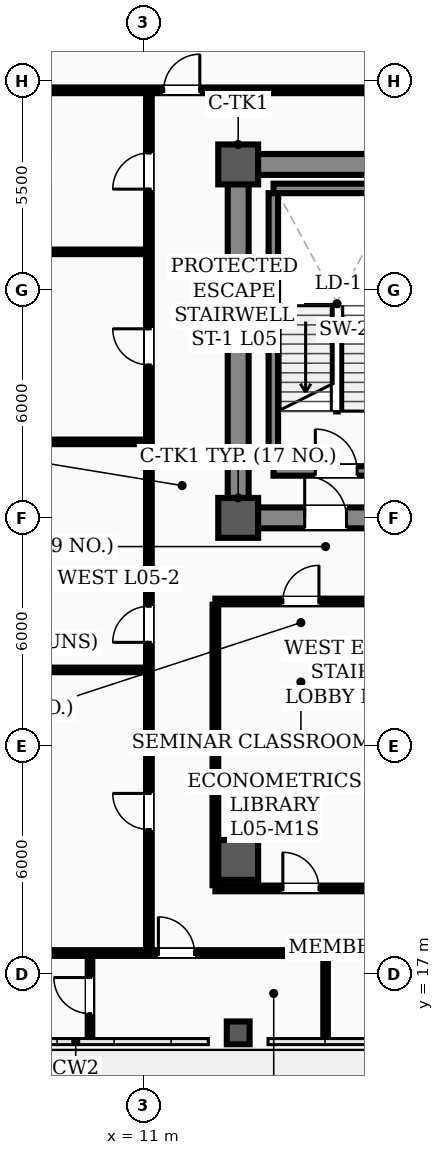
"""IFC4 building model, lengths in metres.
Left out: names, types, materials, properties, quantities, classifications, styles, units other than length and angle.
Written with IfcOpenShell. Run it as: python <this file> out.ifc"""

import sys

from ifc_helpers import new_model, si_unit, direction, frame, frame_2d, origin, origin_2d, place, context, subcontext, project, spatial, rectangle, hollow_rectangle, extrude, element, fill, save


model = new_model("IFC4")
c1 = context("Model", 3, precision=1e-05, world=origin(), true_north=direction((0.0, 1.0)))
c2 = subcontext(c1, "Body", "Model", "MODEL_VIEW")
j1 = project(units=[si_unit("LENGTHUNIT", "METRE"), si_unit("PLANEANGLEUNIT", "RADIAN")], contexts=[c1])
p1 = place(None, origin())
s1 = spatial("IfcSite", under=j1, at=p1, CompositionType="ELEMENT")
p2 = place(p1, origin())
s2 = spatial("IfcBuilding", under=s1, at=p2, CompositionType="ELEMENT")
p3 = place(p2, frame((0.0, 0.0, 22.0)))
s3 = spatial("IfcBuildingStorey", under=s2, at=p3, CompositionType="ELEMENT", Elevation=22.0)
for number, where, z_axis, x_axis in (
    (1, (13.5, 29.0, 0.0), (0.0, 0.0, 1.0), (1.0, 0.0, 0.0)),
    (2, (13.5, 38.3, 0.0), (0.0, 0.0, 1.0), (1.0, 0.0, 0.0)),
    (3, (13.5, 20.0, 0.0), (0.0, 0.0, 1.0), (1.0, 0.0, 0.0)),
):
    element("IfcColumn", number, at=place(p3, frame(where, z_axis=z_axis, x_axis=x_axis)), inside=s3, PredefinedType="COLUMN", context=c2, shape_type="SweptSolid", body=[
        extrude(hollow_rectangle(XDim=1.05, YDim=1.05, WallThickness=0.038, InnerFilletRadius=0.019, OuterFilletRadius=0.057, at=origin_2d()), origin(), (0.0, 0.0, 1.0), 4.5),
    ])
p4 = place(p3, frame((13.5, 15.45, 0.0), z_axis=(0.0, 0.0, 1.0), x_axis=(1.0, 0.0, 0.0)))
e4 = element("IfcColumn", 4, at=p4, inside=s3, PredefinedType="COLUMN", context=c2, shape_type="SweptSolid", body=[
    extrude(hollow_rectangle(XDim=0.6, YDim=0.6, WallThickness=0.026, InnerFilletRadius=0.013, OuterFilletRadius=0.039, at=origin_2d()), origin(), (0.0, 0.0, 1.0), 4.5),
])
p5 = place(p3, frame((13.5, 29.0, 0.0), z_axis=(0.0, 0.0, 1.0), x_axis=(1.0, 0.0, 0.0)))
e5 = element("IfcWall", 5, at=p5, inside=s3, PredefinedType="SHEAR", context=c2, shape_type="SweptSolid", body=[
    extrude(rectangle(XDim=30.5, YDim=0.55, at=frame_2d((15.25, 0.0))), origin(), (0.0, 0.0, 1.0), 4.32),
])
p6 = place(p5, frame((1.75, 0.0, 0.0)))
e6 = element("IfcOpeningElement", 6, at=p6, cuts=e5, PredefinedType="OPENING", context=c2, shape_type="SweptSolid", body=[
    extrude(rectangle(XDim=1.1, YDim=2.08, at=frame_2d((0.55, 1.04))), frame((0.0, 0.285, 0.0), z_axis=(0.0, -1.0, 0.0), x_axis=(1.0, 0.0, 0.0)), (0.0, 0.0, 1.0), 0.57),
])
p7 = place(p5, frame((26.7, 0.0, 0.0)))
e7 = element("IfcOpeningElement", 7, at=p7, cuts=e5, PredefinedType="OPENING", context=c2, shape_type="SweptSolid", body=[
    extrude(rectangle(XDim=1.1, YDim=2.08, at=frame_2d((0.55, 1.04))), frame((0.0, 0.285, 0.0), z_axis=(0.0, -1.0, 0.0), x_axis=(1.0, 0.0, 0.0)), (0.0, 0.0, 1.0), 0.57),
])
p8 = place(p5, frame((6.8, 0.0, 0.0)))
e8 = element("IfcOpeningElement", 8, at=p8, cuts=e5, PredefinedType="OPENING", context=c2, shape_type="SweptSolid", body=[
    extrude(rectangle(XDim=1.1, YDim=2.08, at=frame_2d((0.55, 1.04))), frame((0.0, 0.285, 0.0), z_axis=(0.0, -1.0, 0.0), x_axis=(1.0, 0.0, 0.0)), (0.0, 0.0, 1.0), 0.57),
])
p9 = place(p5, frame((13.2, 0.0, 0.0)))
e9 = element("IfcOpeningElement", 9, at=p9, cuts=e5, PredefinedType="OPENING", context=c2, shape_type="SweptSolid", body=[
    extrude(rectangle(XDim=1.6, YDim=2.08, at=frame_2d((0.8, 1.04))), frame((0.0, 0.285, 0.0), z_axis=(0.0, -1.0, 0.0), x_axis=(1.0, 0.0, 0.0)), (0.0, 0.0, 1.0), 0.57),
])
p10 = place(p5, frame((19.5, 0.0, 0.0)))
e10 = element("IfcOpeningElement", 10, at=p10, cuts=e5, PredefinedType="OPENING", context=c2, shape_type="SweptSolid", body=[
    extrude(rectangle(XDim=0.9, YDim=2.08, at=frame_2d((0.45, 1.04))), frame((0.0, 0.285, 0.0), z_axis=(0.0, -1.0, 0.0), x_axis=(1.0, 0.0, 0.0)), (0.0, 0.0, 1.0), 0.57),
])
p11 = place(p5, frame((21.55, 0.0, 0.0)))
e11 = element("IfcOpeningElement", 11, at=p11, cuts=e5, PredefinedType="OPENING", context=c2, shape_type="SweptSolid", body=[
    extrude(rectangle(XDim=0.9, YDim=2.08, at=frame_2d((0.45, 1.04))), frame((0.0, 0.285, 0.0), z_axis=(0.0, -1.0, 0.0), x_axis=(1.0, 0.0, 0.0)), (0.0, 0.0, 1.0), 0.57),
])
p12 = place(p3, frame((13.5, 38.3, 0.0), z_axis=(0.0, 0.0, 1.0), x_axis=(1.0, 0.0, 0.0)))
e12 = element("IfcWall", 12, at=p12, inside=s3, PredefinedType="SHEAR", context=c2, shape_type="SweptSolid", body=[
    extrude(rectangle(XDim=30.5, YDim=0.55, at=frame_2d((15.25, 0.0))), origin(), (0.0, 0.0, 1.0), 4.32),
])
p13 = place(p3, frame((13.5, 29.35, 0.0), z_axis=(0.0, 0.0, 1.0), x_axis=(0.0, 1.0, 0.0)))
e13 = element("IfcWall", 13, at=p13, inside=s3, PredefinedType="SHEAR", context=c2, shape_type="SweptSolid", body=[
    extrude(rectangle(XDim=8.6, YDim=0.55, at=frame_2d((4.3, 0.0))), origin(), (0.0, 0.0, 1.0), 4.32),
])
p14 = place(p3, frame((14.43, 30.235, 0.0), z_axis=(0.0, 0.0, 1.0), x_axis=(1.0, 0.0, 0.0)))
e14 = element("IfcWall", 14, at=p14, inside=s3, PredefinedType="STANDARD", context=c2, shape_type="SweptSolid", body=[
    extrude(rectangle(XDim=3.34, YDim=0.25, at=frame_2d((1.67, 0.0))), origin(), (0.0, 0.0, 1.0), 4.32),
])
p15 = place(p14, frame((1.1, 0.0, 0.0)))
e15 = element("IfcOpeningElement", 15, at=p15, cuts=e14, PredefinedType="OPENING", context=c2, shape_type="SweptSolid", body=[
    extrude(rectangle(XDim=1.1, YDim=2.08, at=frame_2d((0.55, 1.04))), frame((0.0, 0.135, 0.0), z_axis=(0.0, -1.0, 0.0), x_axis=(1.0, 0.0, 0.0)), (0.0, 0.0, 1.0), 0.27),
])
p16 = place(p3, frame((14.43, 37.669, 0.0), z_axis=(0.0, 0.0, 1.0), x_axis=(1.0, 0.0, 0.0)))
e16 = element("IfcWall", 16, at=p16, inside=s3, PredefinedType="STANDARD", context=c2, shape_type="SweptSolid", body=[
    extrude(rectangle(XDim=3.34, YDim=0.25, at=frame_2d((1.67, 0.0))), origin(), (0.0, 0.0, 1.0), 4.32),
])
p17 = place(p3, frame((14.425, 30.36, 0.0), z_axis=(0.0, 0.0, 1.0), x_axis=(0.0, 1.0, 0.0)))
e17 = element("IfcWall", 17, at=p17, inside=s3, PredefinedType="STANDARD", context=c2, shape_type="SweptSolid", body=[
    extrude(rectangle(XDim=7.184, YDim=0.25, at=frame_2d((3.592, 0.0))), origin(), (0.0, 0.0, 1.0), 4.32),
])
p18 = place(p3, frame((12.9, 26.8, 0.0), z_axis=(0.0, 0.0, 1.0), x_axis=(1.0, 0.0, 0.0)))
e18 = element("IfcWall", 18, at=p18, inside=s3, PredefinedType="PARTITIONING", context=c2, shape_type="SweptSolid", body=[
    extrude(rectangle(XDim=31.7, YDim=0.15, at=frame_2d((15.85, 0.0))), origin(), (0.0, 0.0, 1.0), 3.7),
])
p19 = place(p18, frame((13.6, 0.0, 0.0)))
e19 = element("IfcOpeningElement", 19, at=p19, cuts=e18, PredefinedType="OPENING", context=c2, shape_type="SweptSolid", body=[
    extrude(rectangle(XDim=1.6, YDim=2.08, at=frame_2d((0.8, 1.04))), frame((0.0, 0.085, 0.0), z_axis=(0.0, -1.0, 0.0), x_axis=(1.0, 0.0, 0.0)), (0.0, 0.0, 1.0), 0.17),
])
p20 = place(p18, frame((1.775, 0.0, 0.0)))
e20 = element("IfcOpeningElement", 20, at=p20, cuts=e18, PredefinedType="OPENING", context=c2, shape_type="SweptSolid", body=[
    extrude(rectangle(XDim=0.95, YDim=2.08, at=frame_2d((0.475, 1.04))), frame((0.0, 0.085, 0.0), z_axis=(0.0, -1.0, 0.0), x_axis=(1.0, 0.0, 0.0)), (0.0, 0.0, 1.0), 0.17),
])
p21 = place(p18, frame((6.225, 0.0, 0.0)))
e21 = element("IfcOpeningElement", 21, at=p21, cuts=e18, PredefinedType="OPENING", context=c2, shape_type="SweptSolid", body=[
    extrude(rectangle(XDim=0.95, YDim=2.08, at=frame_2d((0.475, 1.04))), frame((0.0, 0.085, 0.0), z_axis=(0.0, -1.0, 0.0), x_axis=(1.0, 0.0, 0.0)), (0.0, 0.0, 1.0), 0.17),
])
p22 = place(p18, frame((10.625, 0.0, 0.0)))
e22 = element("IfcOpeningElement", 22, at=p22, cuts=e18, PredefinedType="OPENING", context=c2, shape_type="SweptSolid", body=[
    extrude(rectangle(XDim=0.95, YDim=2.08, at=frame_2d((0.475, 1.04))), frame((0.0, 0.085, 0.0), z_axis=(0.0, -1.0, 0.0), x_axis=(1.0, 0.0, 0.0)), (0.0, 0.0, 1.0), 0.17),
])
p23 = place(p18, frame((16.075, 0.0, 0.0)))
e23 = element("IfcOpeningElement", 23, at=p23, cuts=e18, PredefinedType="OPENING", context=c2, shape_type="SweptSolid", body=[
    extrude(rectangle(XDim=0.95, YDim=2.08, at=frame_2d((0.475, 1.04))), frame((0.0, 0.085, 0.0), z_axis=(0.0, -1.0, 0.0), x_axis=(1.0, 0.0, 0.0)), (0.0, 0.0, 1.0), 0.17),
])
p24 = place(p18, frame((21.925, 0.0, 0.0)))
e24 = element("IfcOpeningElement", 24, at=p24, cuts=e18, PredefinedType="OPENING", context=c2, shape_type="SweptSolid", body=[
    extrude(rectangle(XDim=0.95, YDim=2.08, at=frame_2d((0.475, 1.04))), frame((0.0, 0.085, 0.0), z_axis=(0.0, -1.0, 0.0), x_axis=(1.0, 0.0, 0.0)), (0.0, 0.0, 1.0), 0.17),
])
p25 = place(p18, frame((28.625, 0.0, 0.0)))
e25 = element("IfcOpeningElement", 25, at=p25, cuts=e18, PredefinedType="OPENING", context=c2, shape_type="SweptSolid", body=[
    extrude(rectangle(XDim=0.95, YDim=2.08, at=frame_2d((0.475, 1.04))), frame((0.0, 0.085, 0.0), z_axis=(0.0, -1.0, 0.0), x_axis=(1.0, 0.0, 0.0)), (0.0, 0.0, 1.0), 0.17),
])
p26 = place(p3, frame((4.66, 17.55, 0.0), z_axis=(0.0, 0.0, 1.0), x_axis=(1.0, 0.0, 0.0)))
e26 = element("IfcWall", 26, at=p26, inside=s3, PredefinedType="PARTITIONING", context=c2, shape_type="SweptSolid", body=[
    extrude(rectangle(XDim=44.68, YDim=0.15, at=frame_2d((22.34, 0.0))), origin(), (0.0, 0.0, 1.0), 3.7),
])
p27 = place(p26, frame((6.74, 0.0, 0.0)))
e27 = element("IfcOpeningElement", 27, at=p27, cuts=e26, PredefinedType="OPENING", context=c2, shape_type="SweptSolid", body=[
    extrude(rectangle(XDim=0.95, YDim=2.08, at=frame_2d((0.475, 1.04))), frame((0.0, 0.085, 0.0), z_axis=(0.0, -1.0, 0.0), x_axis=(1.0, 0.0, 0.0)), (0.0, 0.0, 1.0), 0.17),
])
p28 = place(p26, frame((13.865, 0.0, 0.0)))
e28 = element("IfcOpeningElement", 28, at=p28, cuts=e26, PredefinedType="OPENING", context=c2, shape_type="SweptSolid", body=[
    extrude(rectangle(XDim=0.95, YDim=2.08, at=frame_2d((0.475, 1.04))), frame((0.0, 0.085, 0.0), z_axis=(0.0, -1.0, 0.0), x_axis=(1.0, 0.0, 0.0)), (0.0, 0.0, 1.0), 0.17),
])
p29 = place(p26, frame((28.765, 0.0, 0.0)))
e29 = element("IfcOpeningElement", 29, at=p29, cuts=e26, PredefinedType="OPENING", context=c2, shape_type="SweptSolid", body=[
    extrude(rectangle(XDim=0.95, YDim=2.08, at=frame_2d((0.475, 1.04))), frame((0.0, 0.085, 0.0), z_axis=(0.0, -1.0, 0.0), x_axis=(1.0, 0.0, 0.0)), (0.0, 0.0, 1.0), 0.17),
])
p30 = place(p26, frame((34.465, 0.0, 0.0)))
e30 = element("IfcOpeningElement", 30, at=p30, cuts=e26, PredefinedType="OPENING", context=c2, shape_type="SweptSolid", body=[
    extrude(rectangle(XDim=0.95, YDim=2.08, at=frame_2d((0.475, 1.04))), frame((0.0, 0.085, 0.0), z_axis=(0.0, -1.0, 0.0), x_axis=(1.0, 0.0, 0.0)), (0.0, 0.0, 1.0), 0.17),
])
p31 = place(p26, frame((39.24, 0.0, 0.0)))
e31 = element("IfcOpeningElement", 31, at=p31, cuts=e26, PredefinedType="OPENING", context=c2, shape_type="SweptSolid", body=[
    extrude(rectangle(XDim=0.95, YDim=2.08, at=frame_2d((0.475, 1.04))), frame((0.0, 0.085, 0.0), z_axis=(0.0, -1.0, 0.0), x_axis=(1.0, 0.0, 0.0)), (0.0, 0.0, 1.0), 0.17),
])
p32 = place(p3, frame((12.9, 19.25, 0.0), z_axis=(0.0, 0.0, 1.0), x_axis=(1.0, 0.0, 0.0)))
e32 = element("IfcWall", 32, at=p32, inside=s3, PredefinedType="PARTITIONING", context=c2, shape_type="SweptSolid", body=[
    extrude(rectangle(XDim=13.3, YDim=0.15, at=frame_2d((6.65, 0.0))), origin(), (0.0, 0.0, 1.0), 3.7),
])
p33 = place(p32, frame((1.775, 0.0, 0.0)))
e33 = element("IfcOpeningElement", 33, at=p33, cuts=e32, PredefinedType="OPENING", context=c2, shape_type="SweptSolid", body=[
    extrude(rectangle(XDim=0.95, YDim=2.08, at=frame_2d((0.475, 1.04))), frame((0.0, 0.085, 0.0), z_axis=(0.0, -1.0, 0.0), x_axis=(1.0, 0.0, 0.0)), (0.0, 0.0, 1.0), 0.17),
])
p34 = place(p32, frame((6.225, 0.0, 0.0)))
e34 = element("IfcOpeningElement", 34, at=p34, cuts=e32, PredefinedType="OPENING", context=c2, shape_type="SweptSolid", body=[
    extrude(rectangle(XDim=0.95, YDim=2.08, at=frame_2d((0.475, 1.04))), frame((0.0, 0.085, 0.0), z_axis=(0.0, -1.0, 0.0), x_axis=(1.0, 0.0, 0.0)), (0.0, 0.0, 1.0), 0.17),
])
p35 = place(p32, frame((12.175, 0.0, 0.0)))
e35 = element("IfcOpeningElement", 35, at=p35, cuts=e32, PredefinedType="OPENING", context=c2, shape_type="SweptSolid", body=[
    extrude(rectangle(XDim=0.95, YDim=2.08, at=frame_2d((0.475, 1.04))), frame((0.0, 0.085, 0.0), z_axis=(0.0, -1.0, 0.0), x_axis=(1.0, 0.0, 0.0)), (0.0, 0.0, 1.0), 0.17),
])
p36 = place(p3, frame((12.9, 23.0, 0.0), z_axis=(0.0, 0.0, 1.0), x_axis=(1.0, 0.0, 0.0)))
e36 = element("IfcWall", 36, at=p36, inside=s3, PredefinedType="PARTITIONING", context=c2, shape_type="SweptSolid", body=[
    extrude(rectangle(XDim=4.5, YDim=0.12, at=frame_2d((2.25, 0.0))), origin(), (0.0, 0.0, 1.0), 3.7),
])
for number, where, z_axis, x_axis in (
    (37, (2.31, 25.0, 0.0), (0.0, 0.0, 1.0), (1.0, 0.0, 0.0)),
    (38, (2.31, 31.0, 0.0), (0.0, 0.0, 1.0), (1.0, 0.0, 0.0)),
    (39, (2.31, 36.0, 0.0), (0.0, 0.0, 1.0), (1.0, 0.0, 0.0)),
):
    element("IfcWall", number, at=place(p3, frame(where, z_axis=z_axis, x_axis=x_axis)), inside=s3, PredefinedType="PARTITIONING", context=c2, shape_type="SweptSolid", body=[
        extrude(rectangle(XDim=8.84, YDim=0.12, at=frame_2d((4.42, 0.0))), origin(), (0.0, 0.0, 1.0), 3.812),
    ])
p37 = place(p3, frame((2.31, 40.25, 0.0), z_axis=(0.0, 0.0, 1.0), x_axis=(1.0, 0.0, 0.0)))
e40 = element("IfcWall", 40, at=p37, inside=s3, PredefinedType="PARTITIONING", context=c2, shape_type="SweptSolid", body=[
    extrude(rectangle(XDim=49.38, YDim=0.15, at=frame_2d((24.69, 0.0))), origin(), (0.0, 0.0, 1.0), 3.7),
])
p38 = place(p37, frame((9.23, 0.0, 0.0)))
e41 = element("IfcOpeningElement", 41, at=p38, cuts=e40, PredefinedType="OPENING", context=c2, shape_type="SweptSolid", body=[
    extrude(rectangle(XDim=0.95, YDim=2.08, at=frame_2d((0.475, 1.04))), frame((0.0, 0.085, 0.0), z_axis=(0.0, -1.0, 0.0), x_axis=(1.0, 0.0, 0.0)), (0.0, 0.0, 1.0), 0.17),
])
p39 = place(p37, frame((18.715, 0.0, 0.0)))
e42 = element("IfcOpeningElement", 42, at=p39, cuts=e40, PredefinedType="OPENING", context=c2, shape_type="SweptSolid", body=[
    extrude(rectangle(XDim=0.95, YDim=2.08, at=frame_2d((0.475, 1.04))), frame((0.0, 0.085, 0.0), z_axis=(0.0, -1.0, 0.0), x_axis=(1.0, 0.0, 0.0)), (0.0, 0.0, 1.0), 0.17),
])
p40 = place(p37, frame((26.715, 0.0, 0.0)))
e43 = element("IfcOpeningElement", 43, at=p40, cuts=e40, PredefinedType="OPENING", context=c2, shape_type="SweptSolid", body=[
    extrude(rectangle(XDim=0.95, YDim=2.08, at=frame_2d((0.475, 1.04))), frame((0.0, 0.085, 0.0), z_axis=(0.0, -1.0, 0.0), x_axis=(1.0, 0.0, 0.0)), (0.0, 0.0, 1.0), 0.17),
])
p41 = place(p37, frame((31.765, 0.0, 0.0)))
e44 = element("IfcOpeningElement", 44, at=p41, cuts=e40, PredefinedType="OPENING", context=c2, shape_type="SweptSolid", body=[
    extrude(rectangle(XDim=0.95, YDim=2.08, at=frame_2d((0.475, 1.04))), frame((0.0, 0.085, 0.0), z_axis=(0.0, -1.0, 0.0), x_axis=(1.0, 0.0, 0.0)), (0.0, 0.0, 1.0), 0.17),
])
p42 = place(p37, frame((42.7, 0.0, 0.0)))
e45 = element("IfcOpeningElement", 45, at=p42, cuts=e40, PredefinedType="OPENING", context=c2, shape_type="SweptSolid", body=[
    extrude(rectangle(XDim=0.95, YDim=2.08, at=frame_2d((0.475, 1.04))), frame((0.0, 0.085, 0.0), z_axis=(0.0, -1.0, 0.0), x_axis=(1.0, 0.0, 0.0)), (0.0, 0.0, 1.0), 0.17),
])
p43 = place(p3, frame((11.15, 17.635, 0.0), z_axis=(0.0, 0.0, 1.0), x_axis=(0.0, 1.0, 0.0)))
e46 = element("IfcWall", 46, at=p43, inside=s3, PredefinedType="PARTITIONING", context=c2, shape_type="SweptSolid", body=[
    extrude(rectangle(XDim=22.53, YDim=0.15, at=frame_2d((11.265, 0.0))), origin(), (0.0, 0.0, 1.0), 3.6),
])
p44 = place(p43, frame((3.165, 0.0, 0.0)))
e47 = element("IfcOpeningElement", 47, at=p44, cuts=e46, PredefinedType="OPENING", context=c2, shape_type="SweptSolid", body=[
    extrude(rectangle(XDim=0.95, YDim=2.08, at=frame_2d((0.475, 1.04))), frame((0.0, 0.085, 0.0), z_axis=(0.0, -1.0, 0.0), x_axis=(1.0, 0.0, 0.0)), (0.0, 0.0, 1.0), 0.17),
])
p45 = place(p43, frame((8.09, 0.0, 0.0)))
e48 = element("IfcOpeningElement", 48, at=p45, cuts=e46, PredefinedType="OPENING", context=c2, shape_type="SweptSolid", body=[
    extrude(rectangle(XDim=0.95, YDim=2.08, at=frame_2d((0.475, 1.04))), frame((0.0, 0.085, 0.0), z_axis=(0.0, -1.0, 0.0), x_axis=(1.0, 0.0, 0.0)), (0.0, 0.0, 1.0), 0.17),
])
p46 = place(p43, frame((15.39, 0.0, 0.0)))
e49 = element("IfcOpeningElement", 49, at=p46, cuts=e46, PredefinedType="OPENING", context=c2, shape_type="SweptSolid", body=[
    extrude(rectangle(XDim=0.95, YDim=2.08, at=frame_2d((0.475, 1.04))), frame((0.0, 0.085, 0.0), z_axis=(0.0, -1.0, 0.0), x_axis=(1.0, 0.0, 0.0)), (0.0, 0.0, 1.0), 0.17),
])
p47 = place(p43, frame((20.015, 0.0, 0.0)))
e50 = element("IfcOpeningElement", 50, at=p47, cuts=e46, PredefinedType="OPENING", context=c2, shape_type="SweptSolid", body=[
    extrude(rectangle(XDim=0.95, YDim=2.08, at=frame_2d((0.475, 1.04))), frame((0.0, 0.085, 0.0), z_axis=(0.0, -1.0, 0.0), x_axis=(1.0, 0.0, 0.0)), (0.0, 0.0, 1.0), 0.17),
])
p48 = place(p3, frame((12.9, 19.335, 0.0), z_axis=(0.0, 0.0, 1.0), x_axis=(0.0, 1.0, 0.0)))
e51 = element("IfcWall", 51, at=p48, inside=s3, PredefinedType="PARTITIONING", context=c2, shape_type="SweptSolid", body=[
    extrude(rectangle(XDim=7.38, YDim=0.15, at=frame_2d((3.69, 0.0))), origin(), (0.0, 0.0, 1.0), 3.6),
])
p49 = place(p3, frame((9.6, 15.31, 0.0), z_axis=(0.0, 0.0, 1.0), x_axis=(0.0, 1.0, 0.0)))
e52 = element("IfcWall", 52, at=p49, inside=s3, PredefinedType="PARTITIONING", context=c2, shape_type="SweptSolid", body=[
    extrude(rectangle(XDim=2.155, YDim=0.12, at=frame_2d((1.078, 0.0))), origin(), (0.0, 0.0, 1.0), 4.32),
])
p50 = place(p49, frame((0.645, 0.0, 0.0)))
e53 = element("IfcOpeningElement", 53, at=p50, cuts=e52, PredefinedType="OPENING", context=c2, shape_type="SweptSolid", body=[
    extrude(rectangle(XDim=0.95, YDim=2.08, at=frame_2d((0.475, 1.04))), frame((0.0, 0.07, 0.0), z_axis=(0.0, -1.0, 0.0), x_axis=(1.0, 0.0, 0.0)), (0.0, 0.0, 1.0), 0.14),
])
p51 = place(p3, frame((15.8, 15.31, 0.0), z_axis=(0.0, 0.0, 1.0), x_axis=(0.0, 1.0, 0.0)))
e54 = element("IfcWall", 54, at=p51, inside=s3, PredefinedType="PARTITIONING", context=c2, shape_type="SweptSolid", body=[
    extrude(rectangle(XDim=2.155, YDim=0.12, at=frame_2d((1.078, 0.0))), origin(), (0.0, 0.0, 1.0), 3.812),
])
p52 = place(p15, origin())
e55 = element("IfcDoor", 55, at=p52, inside=s3, OperationType="SINGLE_SWING_LEFT", PredefinedType="DOOR", context=c2, shape_type="SweptSolid", body=[
    extrude(rectangle(XDim=1.1, YDim=2.08, at=frame_2d((0.55, 1.04))), frame((0.0, 0.025, 0.0), z_axis=(0.0, -1.0, 0.0), x_axis=(1.0, 0.0, 0.0)), (0.0, 0.0, 1.0), 0.05),
])
fill(e15, e55)
p53 = place(p6, origin())
e56 = element("IfcDoor", 56, at=p53, inside=s3, OperationType="SINGLE_SWING_LEFT", PredefinedType="DOOR", context=c2, shape_type="SweptSolid", body=[
    extrude(rectangle(XDim=1.1, YDim=2.08, at=frame_2d((0.55, 1.04))), frame((0.0, 0.025, 0.0), z_axis=(0.0, -1.0, 0.0), x_axis=(1.0, 0.0, 0.0)), (0.0, 0.0, 1.0), 0.05),
])
fill(e6, e56)
p54 = place(p50, origin())
e57 = element("IfcDoor", 57, at=p54, inside=s3, OperationType="SINGLE_SWING_RIGHT", PredefinedType="DOOR", context=c2, shape_type="SweptSolid", body=[
    extrude(rectangle(XDim=0.95, YDim=2.08, at=frame_2d((0.475, 1.04))), frame((0.0, 0.025, 0.0), z_axis=(0.0, -1.0, 0.0), x_axis=(1.0, 0.0, 0.0)), (0.0, 0.0, 1.0), 0.05),
])
fill(e53, e57)
p55 = place(p27, origin())
e58 = element("IfcDoor", 58, at=p55, inside=s3, OperationType="SINGLE_SWING_LEFT", PredefinedType="DOOR", context=c2, shape_type="SweptSolid", body=[
    extrude(rectangle(XDim=0.95, YDim=2.08, at=frame_2d((0.475, 1.04))), frame((0.0, 0.025, 0.0), z_axis=(0.0, -1.0, 0.0), x_axis=(1.0, 0.0, 0.0)), (0.0, 0.0, 1.0), 0.05),
])
fill(e27, e58)
p56 = place(p20, origin())
e59 = element("IfcDoor", 59, at=p56, inside=s3, OperationType="SINGLE_SWING_RIGHT", PredefinedType="DOOR", context=c2, shape_type="SweptSolid", body=[
    extrude(rectangle(XDim=0.95, YDim=2.08, at=frame_2d((0.475, 1.04))), frame((0.0, 0.025, 0.0), z_axis=(0.0, -1.0, 0.0), x_axis=(1.0, 0.0, 0.0)), (0.0, 0.0, 1.0), 0.05),
])
fill(e20, e59)
p57 = place(p33, origin())
e60 = element("IfcDoor", 60, at=p57, inside=s3, OperationType="SINGLE_SWING_LEFT", PredefinedType="DOOR", context=c2, shape_type="SweptSolid", body=[
    extrude(rectangle(XDim=0.95, YDim=2.08, at=frame_2d((0.475, 1.04))), frame((0.0, 0.025, 0.0), z_axis=(0.0, -1.0, 0.0), x_axis=(1.0, 0.0, 0.0)), (0.0, 0.0, 1.0), 0.05),
])
fill(e33, e60)
p58 = place(p44, origin())
e61 = element("IfcDoor", 61, at=p58, inside=s3, OperationType="SINGLE_SWING_RIGHT", PredefinedType="DOOR", context=c2, shape_type="SweptSolid", body=[
    extrude(rectangle(XDim=0.95, YDim=2.08, at=frame_2d((0.475, 1.04))), frame((0.0, 0.025, 0.0), z_axis=(0.0, -1.0, 0.0), x_axis=(1.0, 0.0, 0.0)), (0.0, 0.0, 1.0), 0.05),
])
fill(e47, e61)
p59 = place(p45, origin())
e62 = element("IfcDoor", 62, at=p59, inside=s3, OperationType="SINGLE_SWING_LEFT", PredefinedType="DOOR", context=c2, shape_type="SweptSolid", body=[
    extrude(rectangle(XDim=0.95, YDim=2.08, at=frame_2d((0.475, 1.04))), frame((0.0, 0.025, 0.0), z_axis=(0.0, -1.0, 0.0), x_axis=(1.0, 0.0, 0.0)), (0.0, 0.0, 1.0), 0.05),
])
fill(e48, e62)
p60 = place(p46, origin())
e63 = element("IfcDoor", 63, at=p60, inside=s3, OperationType="SINGLE_SWING_RIGHT", PredefinedType="DOOR", context=c2, shape_type="SweptSolid", body=[
    extrude(rectangle(XDim=0.95, YDim=2.08, at=frame_2d((0.475, 1.04))), frame((0.0, 0.025, 0.0), z_axis=(0.0, -1.0, 0.0), x_axis=(1.0, 0.0, 0.0)), (0.0, 0.0, 1.0), 0.05),
])
fill(e49, e63)
p61 = place(p47, origin())
e64 = element("IfcDoor", 64, at=p61, inside=s3, OperationType="SINGLE_SWING_LEFT", PredefinedType="DOOR", context=c2, shape_type="SweptSolid", body=[
    extrude(rectangle(XDim=0.95, YDim=2.08, at=frame_2d((0.475, 1.04))), frame((0.0, 0.025, 0.0), z_axis=(0.0, -1.0, 0.0), x_axis=(1.0, 0.0, 0.0)), (0.0, 0.0, 1.0), 0.05),
])
fill(e50, e64)
p62 = place(p38, origin())
e65 = element("IfcDoor", 65, at=p62, inside=s3, OperationType="SINGLE_SWING_RIGHT", PredefinedType="DOOR", context=c2, shape_type="SweptSolid", body=[
    extrude(rectangle(XDim=0.95, YDim=2.08, at=frame_2d((0.475, 1.04))), frame((0.0, 0.025, 0.0), z_axis=(0.0, -1.0, 0.0), x_axis=(1.0, 0.0, 0.0)), (0.0, 0.0, 1.0), 0.05),
])
fill(e41, e65)
save(model, sys.argv[1])
